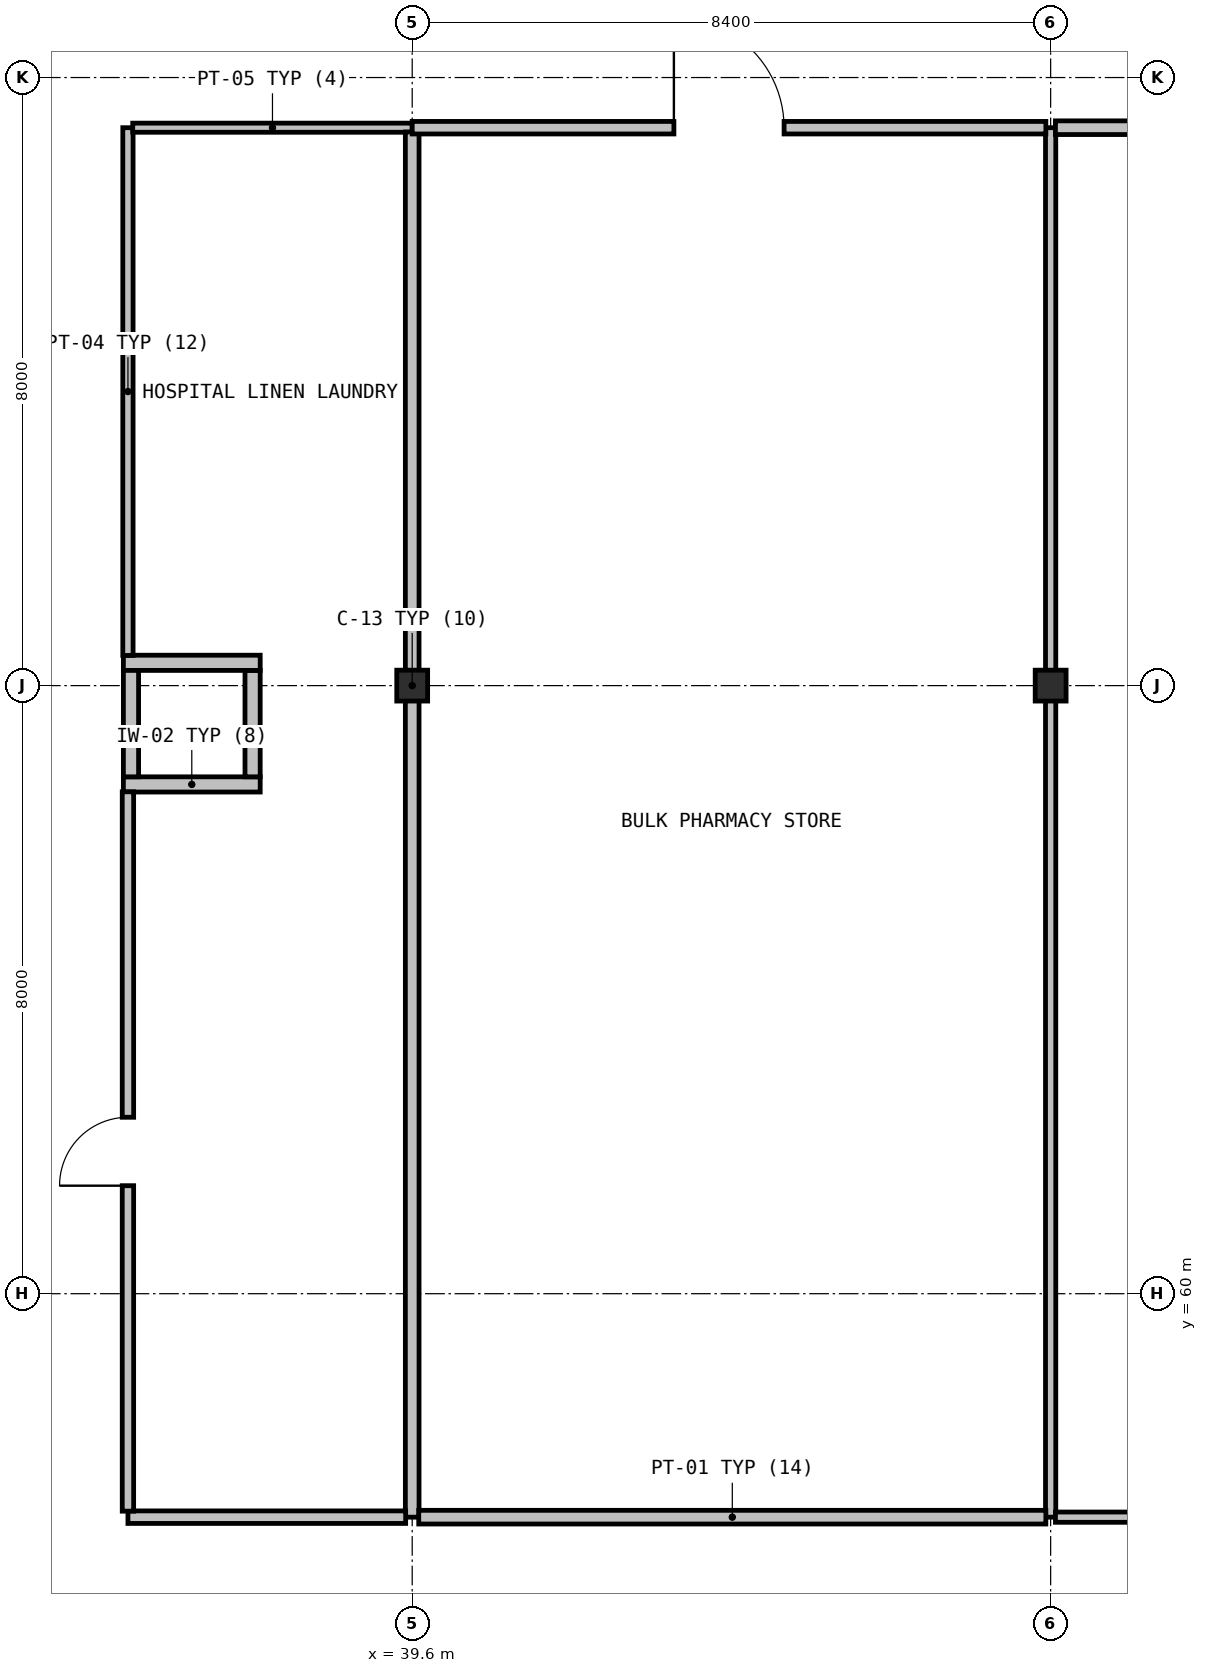
"""IFC4 building model, lengths in metres.
Left out: names, types, materials, properties, quantities, classifications, styles, units other than length and angle.
Written with IfcOpenShell. Run it as: python <this file> out.ifc"""

import sys

from ifc_helpers import new_model, si_unit, direction, frame, frame_2d, origin, origin_2d, place, context, subcontext, project, spatial, rectangle, hollow_circle, extrude, element, fill, save


model = new_model("IFC4")
c1 = context("Model", 3, precision=1e-05, world=origin(), true_north=direction((0.0, 1.0)))
c2 = subcontext(c1, "Body", "Model", "MODEL_VIEW")
j1 = project(units=[si_unit("LENGTHUNIT", "METRE"), si_unit("PLANEANGLEUNIT", "RADIAN")], contexts=[c1])
p1 = place(None, origin())
s1 = spatial("IfcSite", under=j1, at=p1, CompositionType="ELEMENT")
p2 = place(p1, origin())
s2 = spatial("IfcBuilding", under=s1, at=p2, CompositionType="ELEMENT")
p3 = place(p2, frame((0.0, 0.0, -4.8)))
s3 = spatial("IfcBuildingStorey", under=s2, at=p3, CompositionType="ELEMENT", Elevation=-4.8)
for number, where, z_axis, x_axis in (
    (1, (39.6, 68.0, 0.0), (0.0, 0.0, 1.0), (1.0, 0.0, 0.0)),
    (2, (48.0, 68.0, 0.0), (0.0, 0.0, 1.0), (1.0, 0.0, 0.0)),
):
    element("IfcColumn", number, at=place(p3, frame(where, z_axis=z_axis, x_axis=x_axis)), inside=s3, PredefinedType="COLUMN", context=c2, shape_type="SweptSolid", body=[
        extrude(hollow_circle(Radius=0.203, WallThickness=0.016, at=origin_2d()), origin(), (0.0, 0.0, 1.0), 4.8),
    ])
p4 = place(p3, frame((35.8, 66.7, 0.0), z_axis=(0.0, 0.0, 1.0), x_axis=(1.0, 0.0, 0.0)))
e3 = element("IfcWall", 3, at=p4, inside=s3, PredefinedType="SOLIDWALL", context=c2, shape_type="SweptSolid", body=[
    extrude(rectangle(XDim=1.8, YDim=0.2, at=frame_2d((0.9, 0.0))), origin(), (0.0, 0.0, 1.0), 4.45),
])
p5 = place(p3, frame((37.5, 66.8, 0.0), z_axis=(0.0, 0.0, 1.0), x_axis=(0.0, 1.0, 0.0)))
e4 = element("IfcWall", 4, at=p5, inside=s3, PredefinedType="SOLIDWALL", context=c2, shape_type="SweptSolid", body=[
    extrude(rectangle(XDim=1.4, YDim=0.2, at=frame_2d((0.7, 0.0))), origin(), (0.0, 0.0, 1.0), 4.45),
])
p6 = place(p3, frame((37.6, 68.3, 0.0), z_axis=(0.0, 0.0, 1.0), x_axis=(-1.0, 0.0, 0.0)))
e5 = element("IfcWall", 5, at=p6, inside=s3, PredefinedType="SOLIDWALL", context=c2, shape_type="SweptSolid", body=[
    extrude(rectangle(XDim=1.8, YDim=0.2, at=frame_2d((0.9, 0.0))), origin(), (0.0, 0.0, 1.0), 4.45),
])
p7 = place(p3, frame((35.9, 68.2, 0.0), z_axis=(0.0, 0.0, 1.0), x_axis=(0.0, -1.0, 0.0)))
e6 = element("IfcWall", 6, at=p7, inside=s3, PredefinedType="SOLIDWALL", context=c2, shape_type="SweptSolid", body=[
    extrude(rectangle(XDim=1.4, YDim=0.2, at=frame_2d((0.7, 0.0))), origin(), (0.0, 0.0, 1.0), 4.45),
])
p8 = place(p3, frame((35.86, 68.397, 0.0), z_axis=(0.0, 0.0, 1.0), x_axis=(0.0, 1.0, 0.0)))
e7 = element("IfcWall", 7, at=p8, inside=s3, PredefinedType="PARTITIONING", context=c2, shape_type="SweptSolid", body=[
    extrude(rectangle(XDim=6.943, YDim=0.135, at=frame_2d((3.472, 0.0))), origin(), (0.0, 0.0, 1.0), 4.45),
])
p9 = place(p3, frame((35.923, 75.34, 0.0), z_axis=(0.0, 0.0, 1.0), x_axis=(1.0, 0.0, 0.0)))
e8 = element("IfcWall", 8, at=p9, inside=s3, PredefinedType="PARTITIONING", context=c2, shape_type="SweptSolid", body=[
    extrude(rectangle(XDim=3.677, YDim=0.12, at=frame_2d((1.838, 0.0))), origin(), (0.0, 0.0, 1.0), 4.45),
])
p10 = place(p3, frame((39.6, 75.284, 0.0), z_axis=(0.0, 0.0, 1.0), x_axis=(0.0, -1.0, 0.0)))
e9 = element("IfcWall", 9, at=p10, inside=s3, PredefinedType="PARTITIONING", context=c2, shape_type="SweptSolid", body=[
    extrude(rectangle(XDim=18.224, YDim=0.18, at=frame_2d((9.112, 0.0))), origin(), (0.0, 0.0, 1.0), 3.7),
])
p11 = place(p3, frame((39.514, 57.06, 0.0), z_axis=(0.0, 0.0, 1.0), x_axis=(-1.0, 0.0, 0.0)))
e10 = element("IfcWall", 10, at=p11, inside=s3, PredefinedType="PARTITIONING", context=c2, shape_type="SweptSolid", body=[
    extrude(rectangle(XDim=3.654, YDim=0.165, at=frame_2d((1.827, 0.0))), origin(), (0.0, 0.0, 1.0), 4.45),
])
p12 = place(p3, frame((35.86, 57.139, 0.0), z_axis=(0.0, 0.0, 1.0), x_axis=(0.0, 1.0, 0.0)))
e11 = element("IfcWall", 11, at=p12, inside=s3, PredefinedType="PARTITIONING", context=c2, shape_type="SweptSolid", body=[
    extrude(rectangle(XDim=9.464, YDim=0.15, at=frame_2d((4.732, 0.0))), origin(), (0.0, 0.0, 1.0), 4.45),
])
p13 = place(p12, frame((4.282, 0.0, 0.0)))
e12 = element("IfcOpeningElement", 12, at=p13, cuts=e11, PredefinedType="OPENING", context=c2, shape_type="SweptSolid", body=[
    extrude(rectangle(XDim=0.9, YDim=2.1, at=frame_2d((0.45, 1.05))), frame((0.0, 0.085, 0.0), z_axis=(0.0, -1.0, 0.0), x_axis=(1.0, 0.0, 0.0)), (0.0, 0.0, 1.0), 0.17),
])
p14 = place(p3, frame((48.0, 75.34, 0.0), z_axis=(0.0, 0.0, 1.0), x_axis=(0.0, -1.0, 0.0)))
e13 = element("IfcWall", 13, at=p14, inside=s3, PredefinedType="PARTITIONING", context=c2, shape_type="SweptSolid", body=[
    extrude(rectangle(XDim=18.28, YDim=0.135, at=frame_2d((9.14, 0.0))), origin(), (0.0, 0.0, 1.0), 3.7),
])
p15 = place(p3, frame((47.937, 57.06, 0.0), z_axis=(0.0, 0.0, 1.0), x_axis=(-1.0, 0.0, 0.0)))
e14 = element("IfcWall", 14, at=p15, inside=s3, PredefinedType="PARTITIONING", context=c2, shape_type="SweptSolid", body=[
    extrude(rectangle(XDim=8.251, YDim=0.18, at=frame_2d((4.125, 0.0))), origin(), (0.0, 0.0, 1.0), 4.45),
])
p16 = place(p3, frame((39.6, 75.34, 0.0), z_axis=(0.0, 0.0, 1.0), x_axis=(1.0, 0.0, 0.0)))
e15 = element("IfcWall", 15, at=p16, inside=s3, PredefinedType="PARTITIONING", context=c2, shape_type="SweptSolid", body=[
    extrude(rectangle(XDim=8.337, YDim=0.165, at=frame_2d((4.168, 0.0))), origin(), (0.0, 0.0, 1.0), 4.45),
])
p17 = place(p16, frame((3.443, 0.0, 0.0)))
e16 = element("IfcOpeningElement", 16, at=p17, cuts=e15, PredefinedType="OPENING", context=c2, shape_type="SweptSolid", body=[
    extrude(rectangle(XDim=1.45, YDim=2.15, at=frame_2d((0.725, 1.075))), frame((0.0, 0.093, 0.0), z_axis=(0.0, -1.0, 0.0), x_axis=(1.0, 0.0, 0.0)), (0.0, 0.0, 1.0), 0.185),
])
p18 = place(p3, frame((64.721, 57.06, 0.0), z_axis=(0.0, 0.0, 1.0), x_axis=(-1.0, 0.0, 0.0)))
e17 = element("IfcWall", 17, at=p18, inside=s3, PredefinedType="PARTITIONING", context=c2, shape_type="SweptSolid", body=[
    extrude(rectangle(XDim=16.658, YDim=0.135, at=frame_2d((8.329, 0.0))), origin(), (0.0, 0.0, 1.0), 4.45),
])
p19 = place(p18, frame((7.729, 0.0, 0.0)))
e18 = element("IfcOpeningElement", 18, at=p19, cuts=e17, PredefinedType="OPENING", context=c2, shape_type="SweptSolid", body=[
    extrude(rectangle(XDim=1.2, YDim=2.15, at=frame_2d((0.6, 1.075))), frame((0.0, 0.077, 0.0), z_axis=(0.0, -1.0, 0.0), x_axis=(1.0, 0.0, 0.0)), (0.0, 0.0, 1.0), 0.155),
])
p20 = place(p3, frame((48.063, 75.34, 0.0), z_axis=(0.0, 0.0, 1.0), x_axis=(1.0, 0.0, 0.0)))
e19 = element("IfcWall", 19, at=p20, inside=s3, PredefinedType="PARTITIONING", context=c2, shape_type="SweptSolid", body=[
    extrude(rectangle(XDim=16.658, YDim=0.18, at=frame_2d((8.329, 0.0))), origin(), (0.0, 0.0, 1.0), 4.45),
])
p21 = place(p13, origin())
e20 = element("IfcDoor", 20, at=p21, inside=s3, OperationType="SINGLE_SWING_RIGHT", PredefinedType="DOOR", context=c2, shape_type="SweptSolid", body=[
    extrude(rectangle(XDim=0.9, YDim=2.1, at=frame_2d((0.45, 1.05))), frame((0.0, 0.025, 0.0), z_axis=(0.0, -1.0, 0.0), x_axis=(1.0, 0.0, 0.0)), (0.0, 0.0, 1.0), 0.05),
])
fill(e12, e20)
p22 = place(p17, origin())
e21 = element("IfcDoor", 21, at=p22, inside=s3, OperationType="SINGLE_SWING_LEFT", PredefinedType="DOOR", context=c2, shape_type="SweptSolid", body=[
    extrude(rectangle(XDim=1.45, YDim=2.15, at=frame_2d((0.725, 1.075))), frame((0.0, 0.025, 0.0), z_axis=(0.0, -1.0, 0.0), x_axis=(1.0, 0.0, 0.0)), (0.0, 0.0, 1.0), 0.05),
])
fill(e16, e21)
save(model, sys.argv[1])
